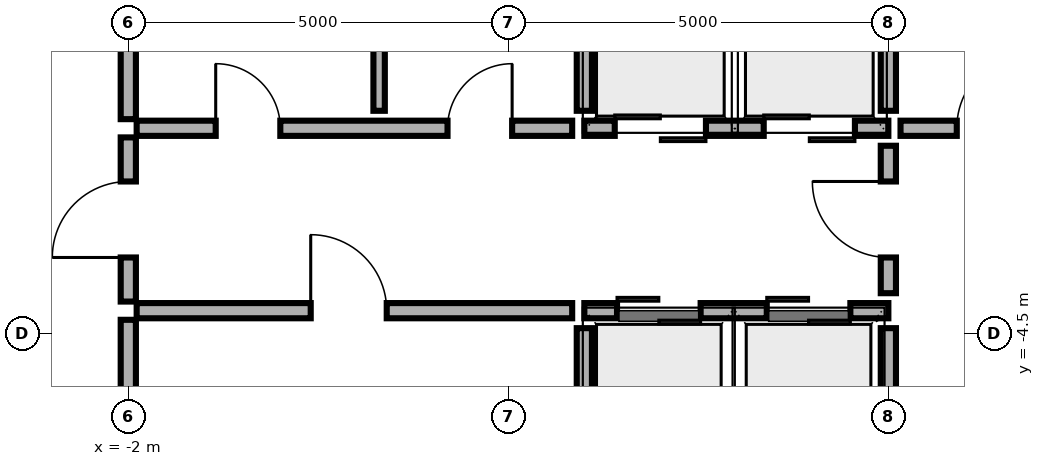
"""IFC4 building model, lengths in metres.
Left out: names, types, materials, properties, quantities, classifications, styles, units other than length and angle.
Written with IfcOpenShell. Run it as: python <this file> out.ifc"""

import sys

from ifc_helpers import new_model, si_unit, direction, frame, frame_2d, origin, place, context, subcontext, project, spatial, rectangle, extrude, element, fill, save


model = new_model("IFC4")
c1 = context("Model", 3, precision=1e-05, world=origin(), true_north=direction((0.0, 1.0)))
c2 = subcontext(c1, "Body", "Model", "MODEL_VIEW")
j1 = project(units=[si_unit("LENGTHUNIT", "METRE"), si_unit("PLANEANGLEUNIT", "RADIAN")], contexts=[c1])
p1 = place(None, origin())
s1 = spatial("IfcSite", under=j1, at=p1, CompositionType="ELEMENT")
p2 = place(p1, origin())
s2 = spatial("IfcBuilding", under=s1, at=p2, CompositionType="ELEMENT")
p3 = place(p2, frame((0.0, 0.0, 285.0)))
s3 = spatial("IfcBuildingStorey", under=s2, at=p3, CompositionType="ELEMENT", Elevation=285.0)
p4 = place(p3, frame((4.0, -1.8, 0.0), z_axis=(0.0, 0.0, 1.0), x_axis=(1.0, 0.0, 0.0)))
e1 = element("IfcWall", 1, at=p4, inside=s3, PredefinedType="SOLIDWALL", context=c2, shape_type="SweptSolid", body=[
    extrude(rectangle(XDim=4.0, YDim=0.2, at=frame_2d((2.0, 0.0))), origin(), (0.0, 0.0, 1.0), 4.08),
])
p5 = place(p4, frame((0.4, 0.0, 0.0)))
e2 = element("IfcOpeningElement", 2, at=p5, cuts=e1, PredefinedType="OPENING", context=c2, shape_type="SweptSolid", body=[
    extrude(rectangle(XDim=1.2, YDim=2.25, at=frame_2d((0.6, 1.125))), frame((0.0, 0.11, 0.0), z_axis=(0.0, -1.0, 0.0), x_axis=(1.0, 0.0, 0.0)), (0.0, 0.0, 1.0), 0.22),
])
p6 = place(p4, frame((2.36, 0.0, 0.0)))
e3 = element("IfcOpeningElement", 3, at=p6, cuts=e1, PredefinedType="OPENING", context=c2, shape_type="SweptSolid", body=[
    extrude(rectangle(XDim=1.2, YDim=2.25, at=frame_2d((0.6, 1.125))), frame((0.0, 0.11, 0.0), z_axis=(0.0, -1.0, 0.0), x_axis=(1.0, 0.0, 0.0)), (0.0, 0.0, 1.0), 0.22),
])
p7 = place(p3, frame((4.0, -1.57, 0.0), z_axis=(0.0, 0.0, 1.0), x_axis=(0.0, 1.0, 0.0)))
e4 = element("IfcWall", 4, at=p7, inside=s3, PredefinedType="SOLIDWALL", context=c2, shape_type="SweptSolid", body=[
    extrude(rectangle(XDim=1.94, YDim=0.2, at=frame_2d((0.97, 0.0))), origin(), (0.0, 0.0, 1.0), 4.08),
])
p8 = place(p3, frame((8.0, -1.57, 0.0), z_axis=(0.0, 0.0, 1.0), x_axis=(0.0, 1.0, 0.0)))
e5 = element("IfcWall", 5, at=p8, inside=s3, PredefinedType="SOLIDWALL", context=c2, shape_type="SweptSolid", body=[
    extrude(rectangle(XDim=2.05, YDim=0.2, at=frame_2d((1.025, 0.0))), origin(), (0.0, 0.0, 1.0), 3.792),
])
p9 = place(p3, frame((4.0, -4.2, 0.0), z_axis=(0.0, 0.0, 1.0), x_axis=(1.0, 0.0, 0.0)))
e6 = element("IfcWall", 6, at=p9, inside=s3, PredefinedType="SOLIDWALL", context=c2, shape_type="SweptSolid", body=[
    extrude(rectangle(XDim=4.0, YDim=0.2, at=frame_2d((2.0, 0.0))), origin(), (0.0, 0.0, 1.0), 4.08),
])
p10 = place(p9, frame((0.43, 0.0, 0.0)))
e7 = element("IfcOpeningElement", 7, at=p10, cuts=e6, PredefinedType="OPENING", context=c2, shape_type="SweptSolid", body=[
    extrude(rectangle(XDim=1.1, YDim=2.2, at=frame_2d((0.55, 1.1))), frame((0.0, 0.11, 0.0), z_axis=(0.0, -1.0, 0.0), x_axis=(1.0, 0.0, 0.0)), (0.0, 0.0, 1.0), 0.22),
])
p11 = place(p9, frame((2.4, 0.0, 0.0)))
e8 = element("IfcOpeningElement", 8, at=p11, cuts=e6, PredefinedType="OPENING", context=c2, shape_type="SweptSolid", body=[
    extrude(rectangle(XDim=1.1, YDim=2.2, at=frame_2d((0.55, 1.1))), frame((0.0, 0.11, 0.0), z_axis=(0.0, -1.0, 0.0), x_axis=(1.0, 0.0, 0.0)), (0.0, 0.0, 1.0), 0.22),
])
p12 = place(p3, frame((4.0, -6.37, 0.0), z_axis=(0.0, 0.0, 1.0), x_axis=(0.0, 1.0, 0.0)))
e9 = element("IfcWall", 9, at=p12, inside=s3, PredefinedType="SOLIDWALL", context=c2, shape_type="SweptSolid", body=[
    extrude(rectangle(XDim=1.94, YDim=0.2, at=frame_2d((0.97, 0.0))), origin(), (0.0, 0.0, 1.0), 4.08),
])
p13 = place(p3, frame((8.0, -6.37, 0.0), z_axis=(0.0, 0.0, 1.0), x_axis=(0.0, 1.0, 0.0)))
e10 = element("IfcWall", 10, at=p13, inside=s3, PredefinedType="SOLIDWALL", context=c2, shape_type="SweptSolid", body=[
    extrude(rectangle(XDim=1.94, YDim=0.2, at=frame_2d((0.97, 0.0))), origin(), (0.0, 0.0, 1.0), 3.792),
])
p14 = place(p3, frame((-2.0, -4.08, 0.0), z_axis=(0.0, 0.0, 1.0), x_axis=(0.0, 1.0, 0.0)))
e11 = element("IfcWall", 11, at=p14, inside=s3, PredefinedType="MOVABLE", context=c2, shape_type="SweptSolid", body=[
    extrude(rectangle(XDim=2.16, YDim=0.2, at=frame_2d((1.08, 0.0))), origin(), (0.0, 0.0, 1.0), 3.792),
])
p15 = place(p14, frame((0.58, 0.0, 0.0)))
e12 = element("IfcOpeningElement", 12, at=p15, cuts=e11, PredefinedType="OPENING", context=c2, shape_type="SweptSolid", body=[
    extrude(rectangle(XDim=1.0, YDim=2.1, at=frame_2d((0.5, 1.05))), frame((0.0, 0.11, 0.0), z_axis=(0.0, -1.0, 0.0), x_axis=(1.0, 0.0, 0.0)), (0.0, 0.0, 1.0), 0.22),
])
p16 = place(p3, frame((8.0, -3.97, 0.0), z_axis=(0.0, 0.0, 1.0), x_axis=(0.0, 1.0, 0.0)))
e13 = element("IfcWall", 13, at=p16, inside=s3, PredefinedType="MOVABLE", context=c2, shape_type="SweptSolid", body=[
    extrude(rectangle(XDim=1.94, YDim=0.2, at=frame_2d((0.97, 0.0))), origin(), (0.0, 0.0, 1.0), 3.792),
])
p17 = place(p16, frame((0.47, 0.0, 0.0)))
e14 = element("IfcOpeningElement", 14, at=p17, cuts=e13, PredefinedType="OPENING", context=c2, shape_type="SweptSolid", body=[
    extrude(rectangle(XDim=1.0, YDim=2.1, at=frame_2d((0.5, 1.05))), frame((0.0, 0.11, 0.0), z_axis=(0.0, -1.0, 0.0), x_axis=(1.0, 0.0, 0.0)), (0.0, 0.0, 1.0), 0.22),
])
p18 = place(p3, frame((-1.89, -1.8, 0.0), z_axis=(0.0, 0.0, 1.0), x_axis=(1.0, 0.0, 0.0)))
e15 = element("IfcWall", 15, at=p18, inside=s3, PredefinedType="MOVABLE", context=c2, shape_type="SweptSolid", body=[
    extrude(rectangle(XDim=5.73, YDim=0.2, at=frame_2d((2.865, 0.0))), origin(), (0.0, 0.0, 1.0), 4.08),
])
p19 = place(p18, frame((1.04, 0.0, 0.0)))
e16 = element("IfcOpeningElement", 16, at=p19, cuts=e15, PredefinedType="OPENING", context=c2, shape_type="SweptSolid", body=[
    extrude(rectangle(XDim=0.85, YDim=2.1, at=frame_2d((0.425, 1.05))), frame((0.0, 0.11, 0.0), z_axis=(0.0, -1.0, 0.0), x_axis=(1.0, 0.0, 0.0)), (0.0, 0.0, 1.0), 0.22),
])
p20 = place(p18, frame((4.09, 0.0, 0.0)))
e17 = element("IfcOpeningElement", 17, at=p20, cuts=e15, PredefinedType="OPENING", context=c2, shape_type="SweptSolid", body=[
    extrude(rectangle(XDim=0.85, YDim=2.1, at=frame_2d((0.425, 1.05))), frame((0.0, 0.11, 0.0), z_axis=(0.0, -1.0, 0.0), x_axis=(1.0, 0.0, 0.0)), (0.0, 0.0, 1.0), 0.22),
])
p21 = place(p3, frame((-1.89, -4.2, 0.0), z_axis=(0.0, 0.0, 1.0), x_axis=(1.0, 0.0, 0.0)))
e18 = element("IfcWall", 18, at=p21, inside=s3, PredefinedType="MOVABLE", context=c2, shape_type="SweptSolid", body=[
    extrude(rectangle(XDim=5.73, YDim=0.2, at=frame_2d((2.865, 0.0))), origin(), (0.0, 0.0, 1.0), 4.08),
])
p22 = place(p21, frame((2.29, 0.0, 0.0)))
e19 = element("IfcOpeningElement", 19, at=p22, cuts=e18, PredefinedType="OPENING", context=c2, shape_type="SweptSolid", body=[
    extrude(rectangle(XDim=1.0, YDim=2.1, at=frame_2d((0.5, 1.05))), frame((0.0, 0.11, 0.0), z_axis=(0.0, -1.0, 0.0), x_axis=(1.0, 0.0, 0.0)), (0.0, 0.0, 1.0), 0.22),
])
p23 = place(p3, frame((8.16, -1.8, 0.0), z_axis=(0.0, 0.0, 1.0), x_axis=(1.0, 0.0, 0.0)))
e20 = element("IfcWall", 20, at=p23, inside=s3, PredefinedType="MOVABLE", context=c2, shape_type="SweptSolid", body=[
    extrude(rectangle(XDim=2.64, YDim=0.2, at=frame_2d((1.32, 0.0))), origin(), (0.0, 0.0, 1.0), 4.08),
])
p24 = place(p23, frame((0.74, 0.0, 0.0)))
e21 = element("IfcOpeningElement", 21, at=p24, cuts=e20, PredefinedType="OPENING", context=c2, shape_type="SweptSolid", body=[
    extrude(rectangle(XDim=1.0, YDim=2.1, at=frame_2d((0.5, 1.05))), frame((0.0, 0.11, 0.0), z_axis=(0.0, -1.0, 0.0), x_axis=(1.0, 0.0, 0.0)), (0.0, 0.0, 1.0), 0.22),
])
p25 = place(p3, frame((1.3, -1.57, 0.0), z_axis=(0.0, 0.0, 1.0), x_axis=(0.0, 1.0, 0.0)))
e22 = element("IfcWall", 22, at=p25, inside=s3, PredefinedType="PARTITIONING", context=c2, shape_type="SweptSolid", body=[
    extrude(rectangle(XDim=1.94, YDim=0.15, at=frame_2d((0.97, 0.0))), origin(), (0.0, 0.0, 1.0), 4.08),
])
p26 = place(p3, frame((-2.0, -1.68, 0.0), z_axis=(0.0, 0.0, 1.0), x_axis=(0.0, 1.0, 0.0)))
e23 = element("IfcWall", 23, at=p26, inside=s3, PredefinedType="MOVABLE", context=c2, shape_type="SweptSolid", body=[
    extrude(rectangle(XDim=2.16, YDim=0.2, at=frame_2d((1.08, 0.0))), origin(), (0.0, 0.0, 1.0), 3.792),
])
p27 = place(p3, frame((-2.0, -6.37, 0.0), z_axis=(0.0, 0.0, 1.0), x_axis=(0.0, 1.0, 0.0)))
e24 = element("IfcWall", 24, at=p27, inside=s3, PredefinedType="MOVABLE", context=c2, shape_type="SweptSolid", body=[
    extrude(rectangle(XDim=2.05, YDim=0.2, at=frame_2d((1.025, 0.0))), origin(), (0.0, 0.0, 1.0), 3.792),
])
p28 = place(p15, origin())
e25 = element("IfcDoor", 25, at=p28, inside=s3, OperationType="SINGLE_SWING_LEFT", PredefinedType="DOOR", context=c2, shape_type="SweptSolid", body=[
    extrude(rectangle(XDim=1.0, YDim=2.1, at=frame_2d((0.5, 1.05))), frame((0.0, 0.025, 0.0), z_axis=(0.0, -1.0, 0.0), x_axis=(1.0, 0.0, 0.0)), (0.0, 0.0, 1.0), 0.05),
])
fill(e12, e25)
p29 = place(p17, origin())
e26 = element("IfcDoor", 26, at=p29, inside=s3, OperationType="SINGLE_SWING_RIGHT", PredefinedType="DOOR", context=c2, shape_type="SweptSolid", body=[
    extrude(rectangle(XDim=1.0, YDim=2.1, at=frame_2d((0.5, 1.05))), frame((0.0, 0.025, 0.0), z_axis=(0.0, -1.0, 0.0), x_axis=(1.0, 0.0, 0.0)), (0.0, 0.0, 1.0), 0.05),
])
fill(e14, e26)
p30 = place(p19, origin())
e27 = element("IfcDoor", 27, at=p30, inside=s3, OperationType="SINGLE_SWING_LEFT", PredefinedType="DOOR", context=c2, shape_type="SweptSolid", body=[
    extrude(rectangle(XDim=0.85, YDim=2.1, at=frame_2d((0.425, 1.05))), frame((0.0, 0.025, 0.0), z_axis=(0.0, -1.0, 0.0), x_axis=(1.0, 0.0, 0.0)), (0.0, 0.0, 1.0), 0.05),
])
fill(e16, e27)
p31 = place(p20, origin())
e28 = element("IfcDoor", 28, at=p31, inside=s3, OperationType="SINGLE_SWING_RIGHT", PredefinedType="DOOR", context=c2, shape_type="SweptSolid", body=[
    extrude(rectangle(XDim=0.85, YDim=2.1, at=frame_2d((0.425, 1.05))), frame((0.0, 0.025, 0.0), z_axis=(0.0, -1.0, 0.0), x_axis=(1.0, 0.0, 0.0)), (0.0, 0.0, 1.0), 0.05),
])
fill(e17, e28)
p32 = place(p22, origin())
e29 = element("IfcDoor", 29, at=p32, inside=s3, OperationType="SINGLE_SWING_LEFT", PredefinedType="DOOR", context=c2, shape_type="SweptSolid", body=[
    extrude(rectangle(XDim=1.0, YDim=2.1, at=frame_2d((0.5, 1.05))), frame((0.0, 0.025, 0.0), z_axis=(0.0, -1.0, 0.0), x_axis=(1.0, 0.0, 0.0)), (0.0, 0.0, 1.0), 0.05),
])
fill(e19, e29)
p33 = place(p24, origin())
e30 = element("IfcDoor", 30, at=p33, inside=s3, OperationType="SINGLE_SWING_RIGHT", PredefinedType="DOOR", context=c2, shape_type="SweptSolid", body=[
    extrude(rectangle(XDim=1.0, YDim=2.1, at=frame_2d((0.5, 1.05))), frame((0.0, 0.025, 0.0), z_axis=(0.0, -1.0, 0.0), x_axis=(1.0, 0.0, 0.0)), (0.0, 0.0, 1.0), 0.05),
])
fill(e21, e30)
p34 = place(p5, origin())
e31 = element("IfcDoor", 31, at=p34, inside=s3, OperationType="DOUBLE_DOOR_SLIDING", PredefinedType="DOOR", context=c2, shape_type="SweptSolid", body=[
    extrude(rectangle(XDim=1.2, YDim=2.25, at=frame_2d((0.6, 1.125))), frame((0.0, 0.025, 0.0), z_axis=(0.0, -1.0, 0.0), x_axis=(1.0, 0.0, 0.0)), (0.0, 0.0, 1.0), 0.05),
])
fill(e2, e31)
p35 = place(p6, origin())
e32 = element("IfcDoor", 32, at=p35, inside=s3, OperationType="DOUBLE_DOOR_SLIDING", PredefinedType="DOOR", context=c2, shape_type="SweptSolid", body=[
    extrude(rectangle(XDim=1.2, YDim=2.25, at=frame_2d((0.6, 1.125))), frame((0.0, 0.025, 0.0), z_axis=(0.0, -1.0, 0.0), x_axis=(1.0, 0.0, 0.0)), (0.0, 0.0, 1.0), 0.05),
])
fill(e3, e32)
p36 = place(p10, origin())
e33 = element("IfcDoor", 33, at=p36, inside=s3, OperationType="DOUBLE_DOOR_SLIDING", PredefinedType="DOOR", context=c2, shape_type="SweptSolid", body=[
    extrude(rectangle(XDim=1.1, YDim=2.2, at=frame_2d((0.55, 1.1))), frame((0.0, 0.025, 0.0), z_axis=(0.0, -1.0, 0.0), x_axis=(1.0, 0.0, 0.0)), (0.0, 0.0, 1.0), 0.05),
])
fill(e7, e33)
p37 = place(p11, origin())
e34 = element("IfcDoor", 34, at=p37, inside=s3, OperationType="DOUBLE_DOOR_SLIDING", PredefinedType="DOOR", context=c2, shape_type="SweptSolid", body=[
    extrude(rectangle(XDim=1.1, YDim=2.2, at=frame_2d((0.55, 1.1))), frame((0.0, 0.025, 0.0), z_axis=(0.0, -1.0, 0.0), x_axis=(1.0, 0.0, 0.0)), (0.0, 0.0, 1.0), 0.05),
])
fill(e8, e34)
save(model, sys.argv[1])
